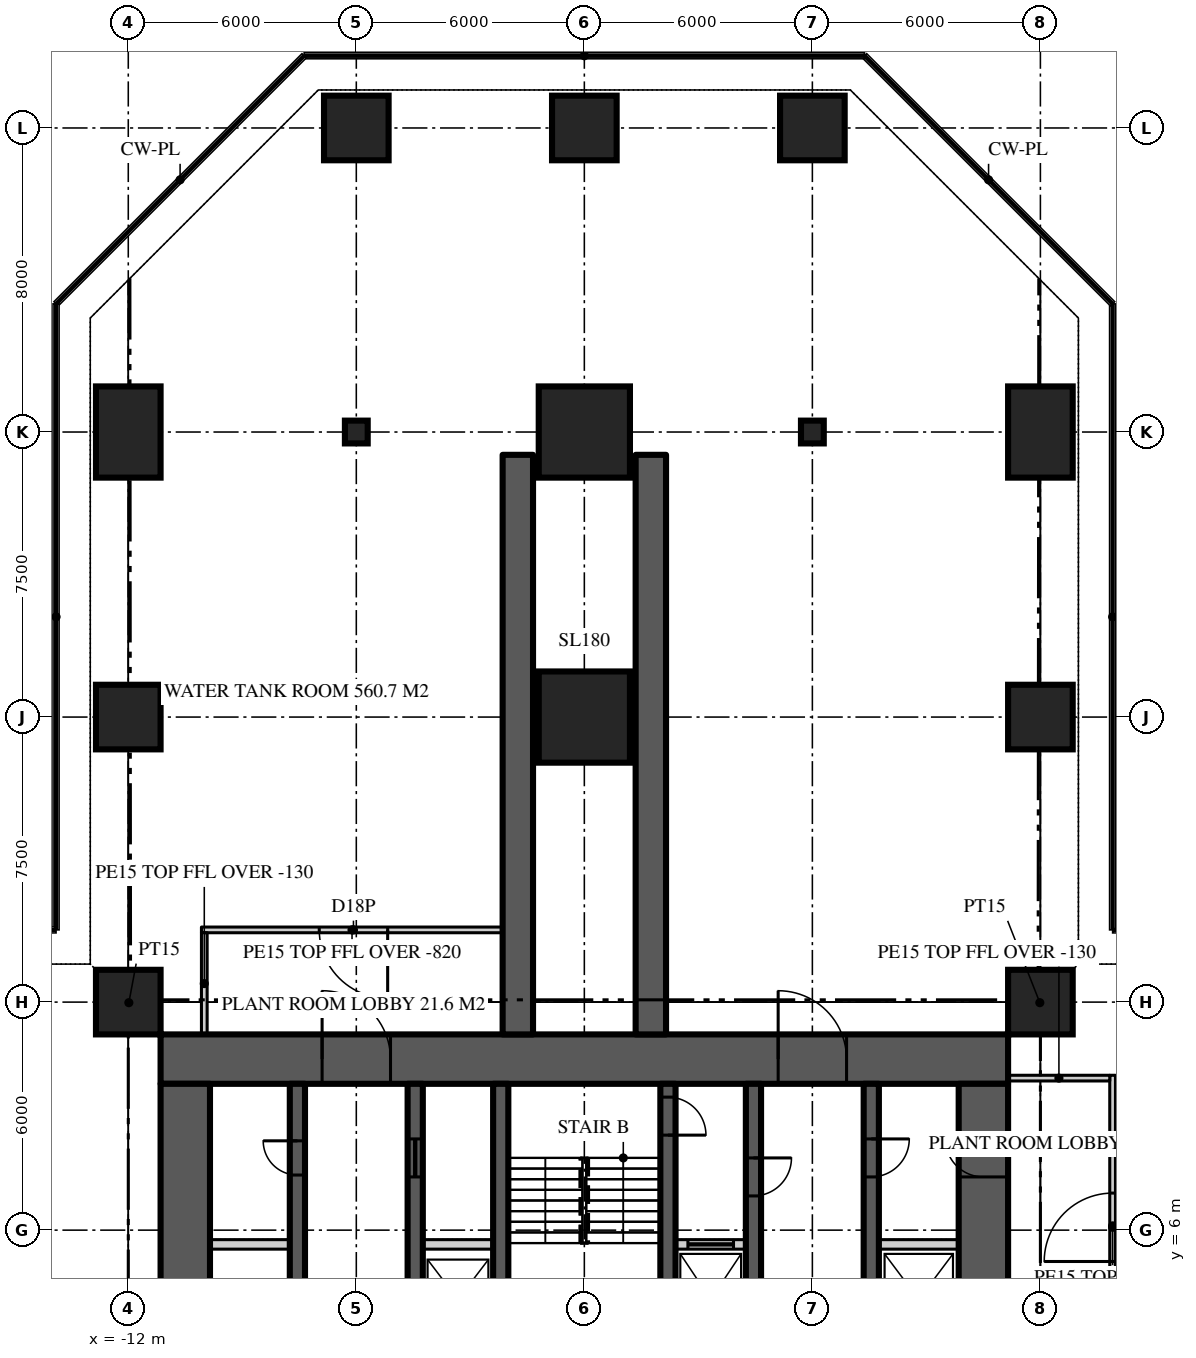
"""IFC4 building model, lengths in metres.
Left out: names, types, materials, properties, quantities, classifications, styles, units other than length and angle.
Written with IfcOpenShell. Run it as: python <this file> out.ifc"""

import sys

from ifc_helpers import new_model, si_unit, direction, frame, frame_2d, origin, origin_2d, place, context, subcontext, project, spatial, rectangle, hollow_rectangle, extrude, element, fill, save


model = new_model("IFC4")
c1 = context("Model", 3, precision=1e-05, world=origin(), true_north=direction((0.0, 1.0)))
c2 = subcontext(c1, "Body", "Model", "MODEL_VIEW")
j1 = project(units=[si_unit("LENGTHUNIT", "METRE"), si_unit("PLANEANGLEUNIT", "RADIAN")], contexts=[c1])
p1 = place(None, origin())
s1 = spatial("IfcSite", under=j1, at=p1, CompositionType="ELEMENT")
p2 = place(p1, origin())
s2 = spatial("IfcBuilding", under=s1, at=p2, CompositionType="ELEMENT")
p3 = place(p2, frame((0.0, 0.0, 118.2)))
s3 = spatial("IfcBuildingStorey", under=s2, at=p3, CompositionType="ELEMENT", Elevation=118.2)
p4 = place(p3, frame((-11.15, 10.5, 0.0), z_axis=(0.0, 0.0, 1.0), x_axis=(1.0, 0.0, 0.0)))
e1 = element("IfcWall", 1, at=p4, inside=s3, PredefinedType="SHEAR", context=c2, shape_type="SweptSolid", body=[
    extrude(rectangle(XDim=22.3, YDim=1.3, at=frame_2d((11.15, 0.0))), origin(), (0.0, 0.0, 1.0), 6.0),
])
p5 = place(p4, frame((4.25, 0.0, 0.0)))
e2 = element("IfcOpeningElement", 2, at=p5, cuts=e1, PredefinedType="OPENING", context=c2, shape_type="SweptSolid", body=[
    extrude(rectangle(XDim=1.8, YDim=2.2, at=frame_2d((0.9, 1.1))), frame((0.0, 0.66, 0.0), z_axis=(0.0, -1.0, 0.0), x_axis=(1.0, 0.0, 0.0)), (0.0, 0.0, 1.0), 1.32),
])
p6 = place(p4, frame((16.25, 0.0, 0.0)))
e3 = element("IfcOpeningElement", 3, at=p6, cuts=e1, PredefinedType="OPENING", context=c2, shape_type="SweptSolid", body=[
    extrude(rectangle(XDim=1.8, YDim=2.2, at=frame_2d((0.9, 1.1))), frame((0.0, 0.66, 0.0), z_axis=(0.0, -1.0, 0.0), x_axis=(1.0, 0.0, 0.0)), (0.0, 0.0, 1.0), 1.32),
])
p7 = place(p3, frame((10.5, -9.85, 0.0), z_axis=(0.0, 0.0, 1.0), x_axis=(0.0, 1.0, 0.0)))
e4 = element("IfcWall", 4, at=p7, inside=s3, PredefinedType="SHEAR", context=c2, shape_type="SweptSolid", body=[
    extrude(rectangle(XDim=19.7, YDim=1.3, at=frame_2d((9.85, 0.0))), origin(), (0.0, 0.0, 1.0), 6.0),
])
p8 = place(p7, frame((17.25, 0.0, 0.0)))
e5 = element("IfcOpeningElement", 5, at=p8, cuts=e4, PredefinedType="OPENING", context=c2, shape_type="SweptSolid", body=[
    extrude(rectangle(XDim=1.0, YDim=2.2, at=frame_2d((0.5, 1.1))), frame((0.0, 0.66, 0.0), z_axis=(0.0, -1.0, 0.0), x_axis=(1.0, 0.0, 0.0)), (0.0, 0.0, 1.0), 1.32),
])
p9 = place(p3, frame((-10.5, 9.85, 0.0), z_axis=(0.0, 0.0, 1.0), x_axis=(0.0, -1.0, 0.0)))
e6 = element("IfcWall", 6, at=p9, inside=s3, PredefinedType="SHEAR", context=c2, shape_type="SweptSolid", body=[
    extrude(rectangle(XDim=19.7, YDim=1.3, at=frame_2d((9.85, 0.0))), origin(), (0.0, 0.0, 1.0), 6.0),
])
p10 = place(p9, frame((17.25, 0.0, 0.0)))
e7 = element("IfcOpeningElement", 7, at=p10, cuts=e6, PredefinedType="OPENING", context=c2, shape_type="SweptSolid", body=[
    extrude(rectangle(XDim=1.0, YDim=2.2, at=frame_2d((0.5, 1.1))), frame((0.0, 0.66, 0.0), z_axis=(0.0, -1.0, 0.0), x_axis=(1.0, 0.0, 0.0)), (0.0, 0.0, 1.0), 1.32),
])
for number, where, z_axis, x_axis in (
    (8, (1.75, 11.15, 0.0), (0.0, 0.0, 1.0), (0.0, 1.0, 0.0)),
    (9, (-1.75, 11.15, 0.0), (0.0, 0.0, 1.0), (0.0, 1.0, 0.0)),
):
    element("IfcWall", number, at=place(p3, frame(where, z_axis=z_axis, x_axis=x_axis)), inside=s3, PredefinedType="SHEAR", context=c2, shape_type="SweptSolid", body=[
        extrude(rectangle(XDim=15.25, YDim=0.8, at=frame_2d((7.625, 0.0))), origin(), (0.0, 0.0, 1.0), 6.0),
    ])
for number, where, z_axis, x_axis in (
    (10, (-12.0, 12.0, 0.0), (0.0, 0.0, 1.0), (1.0, 0.0, 0.0)),
    (11, (12.0, 12.0, 0.0), (0.0, 0.0, 1.0), (1.0, 0.0, 0.0)),
    (12, (-12.0, 19.5, 0.0), (0.0, 0.0, 1.0), (1.0, 0.0, 0.0)),
):
    element("IfcColumn", number, at=place(p3, frame(where, z_axis=z_axis, x_axis=x_axis)), inside=s3, PredefinedType="COLUMN", context=c2, shape_type="SweptSolid", body=[
        extrude(rectangle(XDim=1.7, YDim=1.7, at=origin_2d()), origin(), (0.0, 0.0, 1.0), 6.0),
    ])
p11 = place(p3, frame((0.0, 19.5, 0.0), z_axis=(0.0, 0.0, 1.0), x_axis=(1.0, 0.0, 0.0)))
e13 = element("IfcColumn", 13, at=p11, inside=s3, PredefinedType="COLUMN", context=c2, shape_type="SweptSolid", body=[
    extrude(rectangle(XDim=2.4, YDim=2.4, at=origin_2d()), origin(), (0.0, 0.0, 1.0), 6.0),
])
p12 = place(p3, frame((12.0, 19.5, 0.0), z_axis=(0.0, 0.0, 1.0), x_axis=(1.0, 0.0, 0.0)))
e14 = element("IfcColumn", 14, at=p12, inside=s3, PredefinedType="COLUMN", context=c2, shape_type="SweptSolid", body=[
    extrude(rectangle(XDim=1.7, YDim=1.7, at=origin_2d()), origin(), (0.0, 0.0, 1.0), 6.0),
])
p13 = place(p3, frame((-12.0, 27.0, 0.0), z_axis=(0.0, 0.0, 1.0), x_axis=(1.0, 0.0, 0.0)))
e15 = element("IfcColumn", 15, at=p13, inside=s3, PredefinedType="COLUMN", context=c2, shape_type="SweptSolid", body=[
    extrude(rectangle(XDim=1.7, YDim=2.4, at=origin_2d()), origin(), (0.0, 0.0, 1.0), 6.0),
])
p14 = place(p3, frame((0.0, 27.0, 0.0), z_axis=(0.0, 0.0, 1.0), x_axis=(1.0, 0.0, 0.0)))
e16 = element("IfcColumn", 16, at=p14, inside=s3, PredefinedType="COLUMN", context=c2, shape_type="SweptSolid", body=[
    extrude(rectangle(XDim=2.4, YDim=2.4, at=origin_2d()), origin(), (0.0, 0.0, 1.0), 6.0),
])
p15 = place(p3, frame((12.0, 27.0, 0.0), z_axis=(0.0, 0.0, 1.0), x_axis=(1.0, 0.0, 0.0)))
e17 = element("IfcColumn", 17, at=p15, inside=s3, PredefinedType="COLUMN", context=c2, shape_type="SweptSolid", body=[
    extrude(rectangle(XDim=1.7, YDim=2.4, at=origin_2d()), origin(), (0.0, 0.0, 1.0), 6.0),
])
for number, where, z_axis, x_axis in (
    (18, (-6.0, 35.0, 0.0), (0.0, 0.0, 1.0), (1.0, 0.0, 0.0)),
    (19, (0.0, 35.0, 0.0), (0.0, 0.0, 1.0), (1.0, 0.0, 0.0)),
    (20, (6.0, 35.0, 0.0), (0.0, 0.0, 1.0), (1.0, 0.0, 0.0)),
):
    element("IfcColumn", number, at=place(p3, frame(where, z_axis=z_axis, x_axis=x_axis)), inside=s3, PredefinedType="COLUMN", context=c2, shape_type="SweptSolid", body=[
        extrude(rectangle(XDim=1.7, YDim=1.7, at=origin_2d()), origin(), (0.0, 0.0, 1.0), 6.0),
    ])
for number, where, z_axis, x_axis in (
    (21, (6.0, 27.0, -0.18), (0.0, 0.0, 1.0), (1.0, 0.0, 0.0)),
    (22, (-6.0, 27.0, -0.18), (0.0, 0.0, 1.0), (1.0, 0.0, 0.0)),
):
    element("IfcColumn", number, at=place(p3, frame(where, z_axis=z_axis, x_axis=x_axis)), inside=s3, PredefinedType="COLUMN", context=c2, shape_type="SweptSolid", body=[
        extrude(hollow_rectangle(XDim=1.0, YDim=1.0, WallThickness=0.06, at=origin_2d()), origin(), (0.0, 0.0, 1.0), 5.05),
    ])
p16 = place(p3, frame((-7.55, -9.85, 0.0), z_axis=(0.0, 0.0, 1.0), x_axis=(0.0, 1.0, 0.0)))
e23 = element("IfcWall", 23, at=p16, inside=s3, PredefinedType="SHEAR", context=c2, shape_type="SweptSolid", body=[
    extrude(rectangle(XDim=19.7, YDim=0.4, at=frame_2d((9.85, 0.0))), origin(), (0.0, 0.0, 1.0), 6.0),
])
p17 = place(p16, frame((1.45, 0.0, 0.0)))
e24 = element("IfcOpeningElement", 24, at=p17, cuts=e23, PredefinedType="OPENING", context=c2, shape_type="SweptSolid", body=[
    extrude(rectangle(XDim=1.0, YDim=2.2, at=frame_2d((0.5, 1.1))), frame((0.0, 0.21, 0.0), z_axis=(0.0, -1.0, 0.0), x_axis=(1.0, 0.0, 0.0)), (0.0, 0.0, 1.0), 0.42),
])
p18 = place(p16, frame((17.3, 0.0, 0.0)))
e25 = element("IfcOpeningElement", 25, at=p18, cuts=e23, PredefinedType="OPENING", context=c2, shape_type="SweptSolid", body=[
    extrude(rectangle(XDim=0.9, YDim=2.1, at=frame_2d((0.45, 1.05))), frame((0.0, 0.21, 0.0), z_axis=(0.0, -1.0, 0.0), x_axis=(1.0, 0.0, 0.0)), (0.0, 0.0, 1.0), 0.42),
])
p19 = place(p3, frame((7.55, 9.85, 0.0), z_axis=(0.0, 0.0, 1.0), x_axis=(0.0, -1.0, 0.0)))
e26 = element("IfcWall", 26, at=p19, inside=s3, PredefinedType="SHEAR", context=c2, shape_type="SweptSolid", body=[
    extrude(rectangle(XDim=19.7, YDim=0.4, at=frame_2d((9.85, 0.0))), origin(), (0.0, 0.0, 1.0), 6.0),
])
p20 = place(p19, frame((1.45, 0.0, 0.0)))
e27 = element("IfcOpeningElement", 27, at=p20, cuts=e26, PredefinedType="OPENING", context=c2, shape_type="SweptSolid", body=[
    extrude(rectangle(XDim=1.0, YDim=2.2, at=frame_2d((0.5, 1.1))), frame((0.0, 0.21, 0.0), z_axis=(0.0, -1.0, 0.0), x_axis=(1.0, 0.0, 0.0)), (0.0, 0.0, 1.0), 0.42),
])
p21 = place(p19, frame((17.3, 0.0, 0.0)))
e28 = element("IfcOpeningElement", 28, at=p21, cuts=e26, PredefinedType="OPENING", context=c2, shape_type="SweptSolid", body=[
    extrude(rectangle(XDim=0.9, YDim=2.1, at=frame_2d((0.45, 1.05))), frame((0.0, 0.21, 0.0), z_axis=(0.0, -1.0, 0.0), x_axis=(1.0, 0.0, 0.0)), (0.0, 0.0, 1.0), 0.42),
])
p22 = place(p3, frame((-4.45, -9.85, 0.0), z_axis=(0.0, 0.0, 1.0), x_axis=(0.0, 1.0, 0.0)))
e29 = element("IfcWall", 29, at=p22, inside=s3, PredefinedType="SHEAR", context=c2, shape_type="SweptSolid", body=[
    extrude(rectangle(XDim=19.7, YDim=0.4, at=frame_2d((9.85, 0.0))), origin(), (0.0, 0.0, 1.0), 6.0),
])
p23 = place(p22, frame((1.95, 0.0, 0.0)))
e30 = element("IfcOpeningElement", 30, at=p23, cuts=e29, PredefinedType="OPENING", context=c2, shape_type="SweptSolid", body=[
    extrude(rectangle(XDim=1.0, YDim=2.2, at=frame_2d((0.5, 1.1))), frame((0.0, 0.21, 0.0), z_axis=(0.0, -1.0, 0.0), x_axis=(1.0, 0.0, 0.0)), (0.0, 0.0, 1.0), 0.42),
])
p24 = place(p22, frame((17.25, 0.0, 0.0)))
e31 = element("IfcOpeningElement", 31, at=p24, cuts=e29, PredefinedType="OPENING", context=c2, shape_type="SweptSolid", body=[
    extrude(rectangle(XDim=1.0, YDim=2.1, at=frame_2d((0.5, 1.05))), frame((0.0, 0.21, 0.0), z_axis=(0.0, -1.0, 0.0), x_axis=(1.0, 0.0, 0.0)), (0.0, 0.0, 1.0), 0.42),
])
p25 = place(p3, frame((4.45, 9.85, 0.0), z_axis=(0.0, 0.0, 1.0), x_axis=(0.0, -1.0, 0.0)))
e32 = element("IfcWall", 32, at=p25, inside=s3, PredefinedType="SHEAR", context=c2, shape_type="SweptSolid", body=[
    extrude(rectangle(XDim=19.7, YDim=0.4, at=frame_2d((9.85, 0.0))), origin(), (0.0, 0.0, 1.0), 6.0),
])
p26 = place(p25, frame((1.95, 0.0, 0.0)))
e33 = element("IfcOpeningElement", 33, at=p26, cuts=e32, PredefinedType="OPENING", context=c2, shape_type="SweptSolid", body=[
    extrude(rectangle(XDim=1.0, YDim=2.2, at=frame_2d((0.5, 1.1))), frame((0.0, 0.21, 0.0), z_axis=(0.0, -1.0, 0.0), x_axis=(1.0, 0.0, 0.0)), (0.0, 0.0, 1.0), 0.42),
])
p27 = place(p25, frame((17.3, 0.0, 0.0)))
e34 = element("IfcOpeningElement", 34, at=p27, cuts=e32, PredefinedType="OPENING", context=c2, shape_type="SweptSolid", body=[
    extrude(rectangle(XDim=0.9, YDim=2.1, at=frame_2d((0.45, 1.05))), frame((0.0, 0.21, 0.0), z_axis=(0.0, -1.0, 0.0), x_axis=(1.0, 0.0, 0.0)), (0.0, 0.0, 1.0), 0.42),
])
p28 = place(p3, frame((-2.2, -9.85, 0.0), z_axis=(0.0, 0.0, 1.0), x_axis=(0.0, 1.0, 0.0)))
e35 = element("IfcWall", 35, at=p28, inside=s3, PredefinedType="SHEAR", context=c2, shape_type="SweptSolid", body=[
    extrude(rectangle(XDim=19.7, YDim=0.4, at=frame_2d((9.85, 0.0))), origin(), (0.0, 0.0, 1.0), 6.0),
])
p29 = place(p28, frame((0.35, 0.0, 0.0)))
e36 = element("IfcOpeningElement", 36, at=p29, cuts=e35, PredefinedType="OPENING", context=c2, shape_type="SweptSolid", body=[
    extrude(rectangle(XDim=1.0, YDim=2.2, at=frame_2d((0.5, 1.1))), frame((0.0, 0.21, 0.0), z_axis=(0.0, -1.0, 0.0), x_axis=(1.0, 0.0, 0.0)), (0.0, 0.0, 1.0), 0.42),
])
p30 = place(p3, frame((2.2, 9.85, 0.0), z_axis=(0.0, 0.0, 1.0), x_axis=(0.0, -1.0, 0.0)))
e37 = element("IfcWall", 37, at=p30, inside=s3, PredefinedType="SHEAR", context=c2, shape_type="SweptSolid", body=[
    extrude(rectangle(XDim=19.7, YDim=0.4, at=frame_2d((9.85, 0.0))), origin(), (0.0, 0.0, 1.0), 6.0),
])
p31 = place(p30, frame((0.35, 0.0, 0.0)))
e38 = element("IfcOpeningElement", 38, at=p31, cuts=e37, PredefinedType="OPENING", context=c2, shape_type="SweptSolid", body=[
    extrude(rectangle(XDim=1.0, YDim=2.2, at=frame_2d((0.5, 1.1))), frame((0.0, 0.21, 0.0), z_axis=(0.0, -1.0, 0.0), x_axis=(1.0, 0.0, 0.0)), (0.0, 0.0, 1.0), 0.42),
])
p32 = place(p3, frame((-9.85, 5.625, 0.0), z_axis=(0.0, 0.0, 1.0), x_axis=(1.0, 0.0, 0.0)))
e39 = element("IfcWall", 39, at=p32, inside=s3, PredefinedType="SOLIDWALL", context=c2, shape_type="SweptSolid", body=[
    extrude(rectangle(XDim=2.1, YDim=0.25, at=frame_2d((1.05, 0.0))), origin(), (0.0, 0.0, 1.0), 5.8),
])
p33 = place(p3, frame((-4.25, 5.625, 0.0), z_axis=(0.0, 0.0, 1.0), x_axis=(1.0, 0.0, 0.0)))
e40 = element("IfcWall", 40, at=p33, inside=s3, PredefinedType="SOLIDWALL", context=c2, shape_type="SweptSolid", body=[
    extrude(rectangle(XDim=1.85, YDim=0.25, at=frame_2d((0.925, 0.0))), origin(), (0.0, 0.0, 1.0), 5.8),
])
p34 = place(p3, frame((2.4, 5.625, 0.0), z_axis=(0.0, 0.0, 1.0), x_axis=(1.0, 0.0, 0.0)))
e41 = element("IfcWall", 41, at=p34, inside=s3, PredefinedType="SOLIDWALL", context=c2, shape_type="SweptSolid", body=[
    extrude(rectangle(XDim=1.85, YDim=0.25, at=frame_2d((0.925, 0.0))), origin(), (0.0, 0.0, 1.0), 5.8),
])
p35 = place(p34, frame((0.325, 0.0, 0.0)))
e42 = element("IfcOpeningElement", 42, at=p35, cuts=e41, PredefinedType="OPENING", context=c2, shape_type="SweptSolid", body=[
    extrude(rectangle(XDim=1.2, YDim=2.2, at=frame_2d((0.6, 1.1))), frame((0.0, 0.135, 0.0), z_axis=(0.0, -1.0, 0.0), x_axis=(1.0, 0.0, 0.0)), (0.0, 0.0, 1.0), 0.27),
])
p36 = place(p3, frame((7.75, 5.625, 0.0), z_axis=(0.0, 0.0, 1.0), x_axis=(1.0, 0.0, 0.0)))
e43 = element("IfcWall", 43, at=p36, inside=s3, PredefinedType="SOLIDWALL", context=c2, shape_type="SweptSolid", body=[
    extrude(rectangle(XDim=2.1, YDim=0.25, at=frame_2d((1.05, 0.0))), origin(), (0.0, 0.0, 1.0), 5.8),
])
p37 = place(p3, frame((13.9, 2.15, 0.0), z_axis=(0.0, 0.0, 1.0), x_axis=(0.0, 1.0, 0.0)))
e44 = element("IfcWall", 44, at=p37, inside=s3, PredefinedType="SOLIDWALL", context=c2, shape_type="SweptSolid", body=[
    extrude(rectangle(XDim=7.925, YDim=0.15, at=frame_2d((3.962, 0.0))), origin(), (0.0, 0.0, 1.0), 5.18),
])
p38 = place(p37, frame((3.025, 0.0, 0.0)))
e45 = element("IfcOpeningElement", 45, at=p38, cuts=e44, PredefinedType="OPENING", context=c2, shape_type="SweptSolid", body=[
    extrude(rectangle(XDim=1.8, YDim=2.4, at=frame_2d((0.9, 1.2))), frame((0.0, 0.085, 0.0), z_axis=(0.0, -1.0, 0.0), x_axis=(1.0, 0.0, 0.0)), (0.0, 0.0, 1.0), 0.17),
])
p39 = place(p3, frame((11.15, 10.0, 0.0), z_axis=(0.0, 0.0, 1.0), x_axis=(1.0, 0.0, 0.0)))
e46 = element("IfcWall", 46, at=p39, inside=s3, PredefinedType="SOLIDWALL", context=c2, shape_type="SweptSolid", body=[
    extrude(rectangle(XDim=2.675, YDim=0.15, at=frame_2d((1.337, 0.0))), origin(), (0.0, 0.0, 1.0), 5.87),
])
p40 = place(p3, frame((-2.15, 13.9, 0.0), z_axis=(0.0, 0.0, 1.0), x_axis=(-1.0, 0.0, 0.0)))
e47 = element("IfcWall", 47, at=p40, inside=s3, PredefinedType="SOLIDWALL", context=c2, shape_type="SweptSolid", body=[
    extrude(rectangle(XDim=7.925, YDim=0.15, at=frame_2d((3.962, 0.0))), origin(), (0.0, 0.0, 1.0), 5.18),
])
p41 = place(p40, frame((3.025, 0.0, 0.0)))
e48 = element("IfcOpeningElement", 48, at=p41, cuts=e47, PredefinedType="OPENING", context=c2, shape_type="SweptSolid", body=[
    extrude(rectangle(XDim=1.8, YDim=2.4, at=frame_2d((0.9, 1.2))), frame((0.0, 0.085, 0.0), z_axis=(0.0, -1.0, 0.0), x_axis=(1.0, 0.0, 0.0)), (0.0, 0.0, 1.0), 0.17),
])
p42 = place(p3, frame((-10.0, 11.15, 0.0), z_axis=(0.0, 0.0, 1.0), x_axis=(0.0, 1.0, 0.0)))
e49 = element("IfcWall", 49, at=p42, inside=s3, PredefinedType="SOLIDWALL", context=c2, shape_type="SweptSolid", body=[
    extrude(rectangle(XDim=2.675, YDim=0.15, at=frame_2d((1.337, 0.0))), origin(), (0.0, 0.0, 1.0), 5.87),
])
for number, where, z_axis, x_axis in (
    (50, (11.15, 11.15, 0.0), (0.0, 0.0, 1.0), (0.707, 0.707, 0.0)),
    (51, (-11.15, 11.15, 0.0), (0.0, 0.0, 1.0), (-0.707, 0.707, 0.0)),
):
    element("IfcWall", number, at=place(p3, frame(where, z_axis=z_axis, x_axis=x_axis)), inside=s3, PredefinedType="PARTITIONING", context=c2, shape_type="SweptSolid", body=[
        extrude(rectangle(XDim=2.362, YDim=0.15, at=frame_2d((1.181, 0.0))), origin(), (0.0, 0.0, 1.0), 5.32),
    ])
p43 = place(p5, origin())
e52 = element("IfcDoor", 52, at=p43, inside=s3, OperationType="DOUBLE_DOOR_DOUBLE_SWING", PredefinedType="DOOR", context=c2, shape_type="SweptSolid", body=[
    extrude(rectangle(XDim=1.8, YDim=2.2, at=frame_2d((0.9, 1.1))), frame((0.0, 0.025, 0.0), z_axis=(0.0, -1.0, 0.0), x_axis=(1.0, 0.0, 0.0)), (0.0, 0.0, 1.0), 0.05),
])
fill(e2, e52)
p44 = place(p6, origin())
e53 = element("IfcDoor", 53, at=p44, inside=s3, OperationType="DOUBLE_DOOR_DOUBLE_SWING", PredefinedType="DOOR", context=c2, shape_type="SweptSolid", body=[
    extrude(rectangle(XDim=1.8, YDim=2.2, at=frame_2d((0.9, 1.1))), frame((0.0, 0.025, 0.0), z_axis=(0.0, -1.0, 0.0), x_axis=(1.0, 0.0, 0.0)), (0.0, 0.0, 1.0), 0.05),
])
fill(e3, e53)
p45 = place(p20, origin())
e54 = element("IfcDoor", 54, at=p45, inside=s3, OperationType="SINGLE_SWING_LEFT", PredefinedType="DOOR", context=c2, shape_type="SweptSolid", body=[
    extrude(rectangle(XDim=1.0, YDim=2.2, at=frame_2d((0.5, 1.1))), frame((0.0, 0.025, 0.0), z_axis=(0.0, -1.0, 0.0), x_axis=(1.0, 0.0, 0.0)), (0.0, 0.0, 1.0), 0.05),
])
fill(e27, e54)
p46 = place(p8, origin())
e55 = element("IfcDoor", 55, at=p46, inside=s3, OperationType="SINGLE_SWING_RIGHT", PredefinedType="DOOR", context=c2, shape_type="SweptSolid", body=[
    extrude(rectangle(XDim=1.0, YDim=2.2, at=frame_2d((0.5, 1.1))), frame((0.0, 0.025, 0.0), z_axis=(0.0, -1.0, 0.0), x_axis=(1.0, 0.0, 0.0)), (0.0, 0.0, 1.0), 0.05),
])
fill(e5, e55)
p47 = place(p26, origin())
e56 = element("IfcDoor", 56, at=p47, inside=s3, OperationType="SINGLE_SWING_LEFT", PredefinedType="DOOR", context=c2, shape_type="SweptSolid", body=[
    extrude(rectangle(XDim=1.0, YDim=2.2, at=frame_2d((0.5, 1.1))), frame((0.0, 0.025, 0.0), z_axis=(0.0, -1.0, 0.0), x_axis=(1.0, 0.0, 0.0)), (0.0, 0.0, 1.0), 0.05),
])
fill(e33, e56)
p48 = place(p31, origin())
e57 = element("IfcDoor", 57, at=p48, inside=s3, OperationType="SINGLE_SWING_RIGHT", PredefinedType="DOOR", context=c2, shape_type="SweptSolid", body=[
    extrude(rectangle(XDim=1.0, YDim=2.2, at=frame_2d((0.5, 1.1))), frame((0.0, 0.025, 0.0), z_axis=(0.0, -1.0, 0.0), x_axis=(1.0, 0.0, 0.0)), (0.0, 0.0, 1.0), 0.05),
])
fill(e38, e57)
p49 = place(p18, origin())
e58 = element("IfcDoor", 58, at=p49, inside=s3, OperationType="SINGLE_SWING_RIGHT", PredefinedType="DOOR", context=c2, shape_type="SweptSolid", body=[
    extrude(rectangle(XDim=0.9, YDim=2.1, at=frame_2d((0.45, 1.05))), frame((0.0, 0.025, 0.0), z_axis=(0.0, -1.0, 0.0), x_axis=(1.0, 0.0, 0.0)), (0.0, 0.0, 1.0), 0.05),
])
fill(e25, e58)
p50 = place(p24, origin())
e59 = element("IfcDoor", 59, at=p50, inside=s3, OperationType="SLIDING_TO_LEFT", PredefinedType="DOOR", context=c2, shape_type="SweptSolid", body=[
    extrude(rectangle(XDim=1.0, YDim=2.1, at=frame_2d((0.5, 1.05))), frame((0.0, 0.025, 0.0), z_axis=(0.0, -1.0, 0.0), x_axis=(1.0, 0.0, 0.0)), (0.0, 0.0, 1.0), 0.05),
])
fill(e31, e59)
p51 = place(p35, origin())
e60 = element("IfcDoor", 60, at=p51, inside=s3, OperationType="SLIDING_TO_LEFT", PredefinedType="DOOR", context=c2, shape_type="SweptSolid", body=[
    extrude(rectangle(XDim=1.2, YDim=2.2, at=frame_2d((0.6, 1.1))), frame((0.0, 0.025, 0.0), z_axis=(0.0, -1.0, 0.0), x_axis=(1.0, 0.0, 0.0)), (0.0, 0.0, 1.0), 0.05),
])
fill(e42, e60)
p52 = place(p38, origin())
e61 = element("IfcDoor", 61, at=p52, inside=s3, OperationType="DOUBLE_DOOR_DOUBLE_SWING", PredefinedType="DOOR", context=c2, shape_type="SweptSolid", body=[
    extrude(rectangle(XDim=1.8, YDim=2.4, at=frame_2d((0.9, 1.2))), frame((0.0, 0.025, 0.0), z_axis=(0.0, -1.0, 0.0), x_axis=(1.0, 0.0, 0.0)), (0.0, 0.0, 1.0), 0.05),
])
fill(e45, e61)
p53 = place(p41, origin())
e62 = element("IfcDoor", 62, at=p53, inside=s3, OperationType="DOUBLE_DOOR_DOUBLE_SWING", PredefinedType="DOOR", context=c2, shape_type="SweptSolid", body=[
    extrude(rectangle(XDim=1.8, YDim=2.4, at=frame_2d((0.9, 1.2))), frame((0.0, 0.025, 0.0), z_axis=(0.0, -1.0, 0.0), x_axis=(1.0, 0.0, 0.0)), (0.0, 0.0, 1.0), 0.05),
])
fill(e48, e62)
save(model, sys.argv[1])
